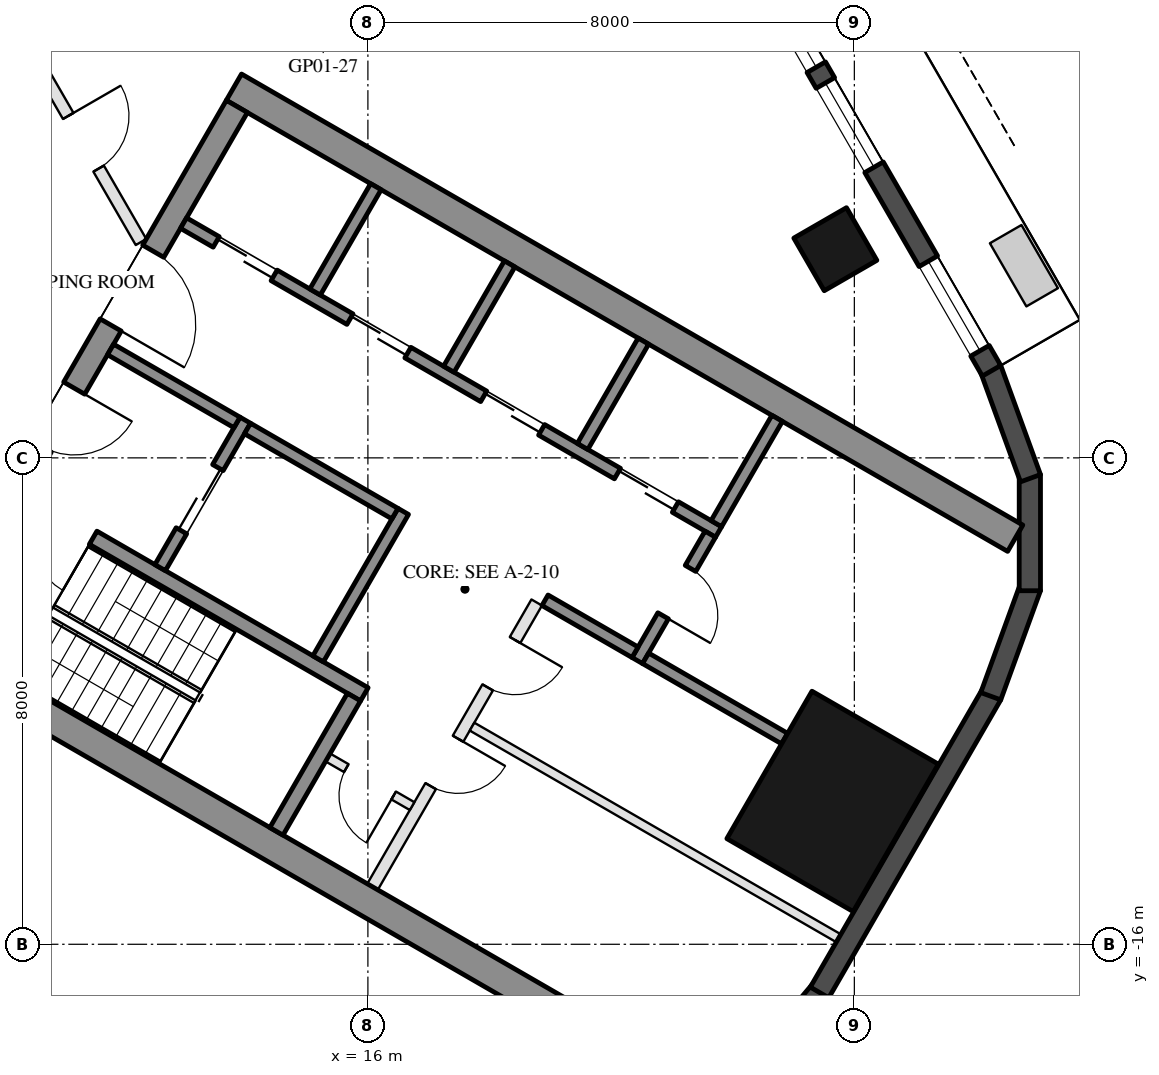
"""IFC4 building model, lengths in metres.
Left out: names, types, materials, properties, quantities, classifications, styles, units other than length and angle.
Written with IfcOpenShell. Run it as: python <this file> out.ifc"""

import sys

from ifc_helpers import new_model, si_unit, direction, frame, frame_2d, origin, origin_2d, place, context, subcontext, project, spatial, rectangle, hollow_rectangle, extrude, element, fill, save


model = new_model("IFC4")
c1 = context("Model", 3, precision=1e-05, world=origin(), true_north=direction((0.0, 1.0)))
c2 = subcontext(c1, "Body", "Model", "MODEL_VIEW")
j1 = project(units=[si_unit("LENGTHUNIT", "METRE"), si_unit("PLANEANGLEUNIT", "RADIAN")], contexts=[c1])
p1 = place(None, origin())
s1 = spatial("IfcSite", under=j1, at=p1, CompositionType="ELEMENT")
p2 = place(p1, origin())
s2 = spatial("IfcBuilding", under=s1, at=p2, CompositionType="ELEMENT")
p3 = place(p2, frame((0.0, 0.0, 50.2)))
s3 = spatial("IfcBuildingStorey", under=s2, at=p3, CompositionType="ELEMENT", Elevation=50.2)
p4 = place(p3, frame((23.688, -4.568, 0.0), z_axis=(0.0, 0.0, 1.0), x_axis=(-0.5, 0.866025403784, 0.0)))
e1 = element("IfcColumn", 1, at=p4, inside=s3, PredefinedType="COLUMN", context=c2, shape_type="SweptSolid", body=[
    extrude(hollow_rectangle(XDim=1.0, YDim=1.0, WallThickness=0.045, at=origin_2d()), origin(), (0.0, 0.0, 1.0), 3.7),
])
p5 = place(p3, frame((23.643, -13.65, 0.0), z_axis=(0.0, 0.0, 1.0), x_axis=(0.5, 0.866025403784, 0.0)))
e2 = element("IfcColumn", 2, at=p5, inside=s3, PredefinedType="COLUMN", context=c2, shape_type="SweptSolid", body=[
    extrude(hollow_rectangle(XDim=2.8, YDim=2.4, WallThickness=0.07, at=origin_2d()), origin(), (0.0, 0.0, 1.0), 3.7),
])
p6 = place(p3, frame((22.217, -18.231, 0.0), z_axis=(0.0, 0.0, 1.0), x_axis=(0.642733291068, 0.76609001857, 0.0)))
e3 = element("IfcWall", 3, at=p6, inside=s3, PredefinedType="SOLIDWALL", context=c2, shape_type="SweptSolid", body=[
    extrude(rectangle(XDim=1.91, YDim=0.35, at=frame_2d((0.955, 0.0))), origin(), (0.0, 0.0, 1.0), 3.55),
])
p7 = place(p3, frame((23.427, -16.792, 0.0), z_axis=(0.0, 0.0, 1.0), x_axis=(0.500018773155, 0.866014564827, 0.0)))
e4 = element("IfcWall", 4, at=p7, inside=s3, PredefinedType="SOLIDWALL", context=c2, shape_type="SweptSolid", body=[
    extrude(rectangle(XDim=5.658, YDim=0.35, at=frame_2d((2.829, 0.0))), origin(), (0.0, 0.0, 1.0), 3.55),
])
for number, where, z_axis, x_axis in (
    (5, (26.244, -11.92, 0.0), (0.0, 0.0, 1.0), (0.342, 0.94, 0.0)),
    (6, (26.886, -10.185, 0.0), (0.0, 0.0, 1.0), (0.0, 1.0, 0.0)),
    (7, (26.897, -8.335, 0.0), (0.0, 0.0, 1.0), (-0.342, 0.94, 0.0)),
):
    element("IfcWall", number, at=place(p3, frame(where, z_axis=z_axis, x_axis=x_axis)), inside=s3, PredefinedType="SOLIDWALL", context=c2, shape_type="SweptSolid", body=[
        extrude(rectangle(XDim=1.91, YDim=0.35, at=frame_2d((0.955, 0.0))), origin(), (0.0, 0.0, 1.0), 3.55),
    ])
p8 = place(p3, frame((26.257, -6.567, 0.0), z_axis=(0.0, 0.0, 1.0), x_axis=(-0.500023526245, 0.866011820475, 0.0)))
e8 = element("IfcWall", 8, at=p8, inside=s3, PredefinedType="SOLIDWALL", context=c2, shape_type="SweptSolid", body=[
    extrude(rectangle(XDim=11.816, YDim=0.35, at=frame_2d((5.908, 0.0))), origin(), (0.0, 0.0, 1.0), 3.55),
])
p9 = place(p8, frame((0.38, 0.0, 0.3)))
e9 = element("IfcOpeningElement", 9, at=p9, cuts=e8, PredefinedType="OPENING", context=c2, shape_type="SweptSolid", body=[
    extrude(rectangle(XDim=1.7, YDim=2.65, at=frame_2d((0.85, 1.325))), frame((0.0, 0.185, 0.0), z_axis=(0.0, -1.0, 0.0), x_axis=(1.0, 0.0, 0.0)), (0.0, 0.0, 1.0), 0.37),
])
p10 = place(p8, frame((7.666, 0.0, 0.0)))
e10 = element("IfcOpeningElement", 10, at=p10, cuts=e8, PredefinedType="OPENING", context=c2, shape_type="SweptSolid", body=[
    extrude(rectangle(XDim=2.4, YDim=2.4, at=frame_2d((1.2, 1.2))), frame((0.0, 0.185, 0.0), z_axis=(0.0, -1.0, 0.0), x_axis=(1.0, 0.0, 0.0)), (0.0, 0.0, 1.0), 0.37),
])
p11 = place(p8, frame((3.865, 0.0, 0.3)))
e11 = element("IfcOpeningElement", 11, at=p11, cuts=e8, PredefinedType="OPENING", context=c2, shape_type="SweptSolid", body=[
    extrude(rectangle(XDim=1.6, YDim=2.65, at=frame_2d((0.8, 1.325))), frame((0.0, 0.185, 0.0), z_axis=(0.0, -1.0, 0.0), x_axis=(1.0, 0.0, 0.0)), (0.0, 0.0, 1.0), 0.37),
])
p12 = place(p8, frame((5.765, 0.0, 0.3)))
e12 = element("IfcOpeningElement", 12, at=p12, cuts=e8, PredefinedType="OPENING", context=c2, shape_type="SweptSolid", body=[
    extrude(rectangle(XDim=1.6, YDim=2.65, at=frame_2d((0.8, 1.325))), frame((0.0, 0.185, 0.0), z_axis=(0.0, -1.0, 0.0), x_axis=(1.0, 0.0, 0.0)), (0.0, 0.0, 1.0), 0.37),
])
for number, where, z_axis, x_axis in (
    (13, (8.547, -10.997, 0.0), (0.0, 0.0, 1.0), (0.866, -0.5, 0.0)),
    (14, (13.797, -1.903, 0.0), (0.0, 0.0, 1.0), (0.866, -0.5, 0.0)),
):
    element("IfcWall", number, at=place(p3, frame(where, z_axis=z_axis, x_axis=x_axis)), inside=s3, PredefinedType="SHEAR", context=c2, shape_type="SweptSolid", body=[
        extrude(rectangle(XDim=14.837, YDim=0.5, at=frame_2d((7.418, 0.0))), origin(), (0.0, 0.0, 1.0), 3.5),
    ])
p13 = place(p3, frame((8.845, -10.88, 0.0), z_axis=(0.0, 0.0, 1.0), x_axis=(0.500004234368, 0.866022959057, 0.0)))
e15 = element("IfcWall", 15, at=p13, inside=s3, PredefinedType="SHEAR", context=c2, shape_type="SweptSolid", body=[
    extrude(rectangle(XDim=10.0, YDim=0.4, at=frame_2d((5.0, 0.0))), origin(), (0.0, 0.0, 1.0), 3.5),
])
p14 = place(p13, frame((3.55, 0.0, 0.0)))
e16 = element("IfcOpeningElement", 16, at=p14, cuts=e15, PredefinedType="OPENING", context=c2, shape_type="SweptSolid", body=[
    extrude(rectangle(XDim=1.1, YDim=2.1, at=frame_2d((0.55, 1.05))), frame((0.0, 0.21, 0.0), z_axis=(0.0, -1.0, 0.0), x_axis=(1.0, 0.0, 0.0)), (0.0, 0.0, 1.0), 0.42),
])
p15 = place(p13, frame((5.85, 0.0, 0.0)))
e17 = element("IfcOpeningElement", 17, at=p15, cuts=e15, PredefinedType="OPENING", context=c2, shape_type="SweptSolid", body=[
    extrude(rectangle(XDim=1.4, YDim=2.1, at=frame_2d((0.7, 1.05))), frame((0.0, 0.21, 0.0), z_axis=(0.0, -1.0, 0.0), x_axis=(1.0, 0.0, 0.0)), (0.0, 0.0, 1.0), 0.42),
])
p16 = place(p3, frame((10.356, -8.664, 0.0), z_axis=(0.0, 0.0, 1.0), x_axis=(0.866028629588, -0.499994412703, 0.0)))
e18 = element("IfcWall", 18, at=p16, inside=s3, PredefinedType="SHEAR", context=c2, shape_type="SweptSolid", body=[
    extrude(rectangle(XDim=6.45, YDim=0.25, at=frame_2d((3.225, 0.0))), origin(), (0.0, 0.0, 1.0), 3.5),
])
p17 = place(p16, frame((0.3, 0.0, 0.0)))
e19 = element("IfcOpeningElement", 19, at=p17, cuts=e18, PredefinedType="OPENING", context=c2, shape_type="SweptSolid", body=[
    extrude(rectangle(XDim=1.0, YDim=2.1, at=frame_2d((0.5, 1.05))), frame((0.0, 0.135, 0.0), z_axis=(0.0, -1.0, 0.0), x_axis=(1.0, 0.0, 0.0)), (0.0, 0.0, 1.0), 0.27),
])
p18 = place(p3, frame((14.496, -14.143, 0.0), z_axis=(0.0, 0.0, 1.0), x_axis=(0.500062241894, 0.865989465428, 0.0)))
e20 = element("IfcWall", 20, at=p18, inside=s3, PredefinedType="SHEAR", context=c2, shape_type="SweptSolid", body=[
    extrude(rectangle(XDim=2.55, YDim=0.25, at=frame_2d((1.275, 0.0))), origin(), (0.0, 0.0, 1.0), 3.5),
])
p19 = place(p3, frame((15.181, -11.305, 0.0), z_axis=(0.0, 0.0, 1.0), x_axis=(0.49994636267, 0.866056369097, 0.0)))
e21 = element("IfcWall", 21, at=p19, inside=s3, PredefinedType="SHEAR", context=c2, shape_type="SweptSolid", body=[
    extrude(rectangle(XDim=2.8, YDim=0.2, at=frame_2d((1.4, 0.0))), origin(), (0.0, 0.0, 1.0), 3.5),
])
p20 = place(p3, frame((12.583, -9.805, 0.0), z_axis=(0.0, 0.0, 1.0), x_axis=(0.49994636267, 0.866056369097, 0.0)))
e22 = element("IfcWall", 22, at=p20, inside=s3, PredefinedType="SHEAR", context=c2, shape_type="SweptSolid", body=[
    extrude(rectangle(XDim=2.8, YDim=0.2, at=frame_2d((1.4, 0.0))), origin(), (0.0, 0.0, 1.0), 3.5),
])
p21 = place(p20, frame((0.7, 0.0, 0.0)))
e23 = element("IfcOpeningElement", 23, at=p21, cuts=e22, PredefinedType="OPENING", context=c2, shape_type="SweptSolid", body=[
    extrude(rectangle(XDim=1.2, YDim=2.1, at=frame_2d((0.6, 1.05))), frame((0.0, 0.11, 0.0), z_axis=(0.0, -1.0, 0.0), x_axis=(1.0, 0.0, 0.0)), (0.0, 0.0, 1.0), 0.22),
])
p22 = place(p3, frame((11.768, -6.217, 0.0), z_axis=(0.0, 0.0, 1.0), x_axis=(0.866050077142, -0.499957262057, 0.0)))
e24 = element("IfcWall", 24, at=p22, inside=s3, PredefinedType="SHEAR", context=c2, shape_type="SweptSolid", body=[
    extrude(rectangle(XDim=2.4, YDim=0.2, at=frame_2d((1.2, 0.0))), origin(), (0.0, 0.0, 1.0), 3.5),
])
p23 = place(p3, frame((14.02, -7.517, 0.0), z_axis=(0.0, 0.0, 1.0), x_axis=(0.866034573852, -0.49998411664, 0.0)))
e25 = element("IfcWall", 25, at=p23, inside=s3, PredefinedType="SHEAR", context=c2, shape_type="SweptSolid", body=[
    extrude(rectangle(XDim=2.8, YDim=0.2, at=frame_2d((1.4, 0.0))), origin(), (0.0, 0.0, 1.0), 3.5),
])
p24 = place(p3, frame((12.968, -4.138, 0.0), z_axis=(0.0, 0.0, 1.0), x_axis=(0.866028328073, -0.49999493495, 0.0)))
e26 = element("IfcWall", 26, at=p24, inside=s3, PredefinedType="SHEAR", context=c2, shape_type="SweptSolid", body=[
    extrude(rectangle(XDim=10.16, YDim=0.2, at=frame_2d((5.08, 0.0))), origin(), (0.0, 0.0, 1.0), 3.5),
])
p25 = place(p24, frame((0.62, 0.0, 0.0)))
e27 = element("IfcOpeningElement", 27, at=p25, cuts=e26, PredefinedType="OPENING", context=c2, shape_type="SweptSolid", body=[
    extrude(rectangle(XDim=1.1, YDim=2.1, at=frame_2d((0.55, 1.05))), frame((0.0, 0.11, 0.0), z_axis=(0.0, -1.0, 0.0), x_axis=(1.0, 0.0, 0.0)), (0.0, 0.0, 1.0), 0.22),
])
p26 = place(p24, frame((3.16, 0.0, 0.0)))
e28 = element("IfcOpeningElement", 28, at=p26, cuts=e26, PredefinedType="OPENING", context=c2, shape_type="SweptSolid", body=[
    extrude(rectangle(XDim=1.1, YDim=2.1, at=frame_2d((0.55, 1.05))), frame((0.0, 0.11, 0.0), z_axis=(0.0, -1.0, 0.0), x_axis=(1.0, 0.0, 0.0)), (0.0, 0.0, 1.0), 0.22),
])
p27 = place(p24, frame((5.7, 0.0, 0.0)))
e29 = element("IfcOpeningElement", 29, at=p27, cuts=e26, PredefinedType="OPENING", context=c2, shape_type="SweptSolid", body=[
    extrude(rectangle(XDim=1.1, YDim=2.1, at=frame_2d((0.55, 1.05))), frame((0.0, 0.11, 0.0), z_axis=(0.0, -1.0, 0.0), x_axis=(1.0, 0.0, 0.0)), (0.0, 0.0, 1.0), 0.22),
])
p28 = place(p24, frame((8.24, 0.0, 0.0)))
e30 = element("IfcOpeningElement", 30, at=p28, cuts=e26, PredefinedType="OPENING", context=c2, shape_type="SweptSolid", body=[
    extrude(rectangle(XDim=1.1, YDim=2.1, at=frame_2d((0.55, 1.05))), frame((0.0, 0.11, 0.0), z_axis=(0.0, -1.0, 0.0), x_axis=(1.0, 0.0, 0.0)), (0.0, 0.0, 1.0), 0.22),
])
p29 = place(p3, frame((20.43, -11.333, 0.0), z_axis=(0.0, 0.0, 1.0), x_axis=(0.500001309137, 0.866024647952, 0.0)))
e31 = element("IfcWall", 31, at=p29, inside=s3, PredefinedType="SHEAR", context=c2, shape_type="SweptSolid", body=[
    extrude(rectangle(XDim=2.4, YDim=0.2, at=frame_2d((1.2, 0.0))), origin(), (0.0, 0.0, 1.0), 3.5),
])
p30 = place(p29, frame((0.85, 0.0, 0.0)))
e32 = element("IfcOpeningElement", 32, at=p30, cuts=e31, PredefinedType="OPENING", context=c2, shape_type="SweptSolid", body=[
    extrude(rectangle(XDim=0.9, YDim=2.1, at=frame_2d((0.45, 1.05))), frame((0.0, 0.11, 0.0), z_axis=(0.0, -1.0, 0.0), x_axis=(1.0, 0.0, 0.0)), (0.0, 0.0, 1.0), 0.22),
])
p31 = place(p3, frame((18.913, -10.342, 0.0), z_axis=(0.0, 0.0, 1.0), x_axis=(0.866038183914, -0.499977863513, 0.0)))
e33 = element("IfcWall", 33, at=p31, inside=s3, PredefinedType="SHEAR", context=c2, shape_type="SweptSolid", body=[
    extrude(rectangle(XDim=1.71, YDim=0.2, at=frame_2d((0.855, 0.0))), origin(), (0.0, 0.0, 1.0), 3.5),
])
for number, where, z_axis, x_axis in (
    (34, (15.131, -5.272, 0.0), (0.0, 0.0, 1.0), (0.5, 0.866, 0.0)),
    (35, (17.331, -6.542, 0.0), (0.0, 0.0, 1.0), (0.5, 0.866, 0.0)),
    (36, (19.531, -7.812, 0.0), (0.0, 0.0, 1.0), (0.5, 0.866, 0.0)),
    (37, (21.73, -9.082, 0.0), (0.0, 0.0, 1.0), (0.5, 0.866, 0.0)),
):
    element("IfcWall", number, at=place(p3, frame(where, z_axis=z_axis, x_axis=x_axis)), inside=s3, PredefinedType="SHEAR", context=c2, shape_type="SweptSolid", body=[
        extrude(rectangle(XDim=2.0, YDim=0.2, at=frame_2d((1.0, 0.0))), origin(), (0.0, 0.0, 1.0), 3.5),
    ])
p32 = place(p3, frame((20.567, -11.297, 0.0), z_axis=(0.0, 0.0, 1.0), x_axis=(0.866060851709, -0.499938597367, 0.0)))
e38 = element("IfcWall", 38, at=p32, inside=s3, PredefinedType="SHEAR", context=c2, shape_type="SweptSolid", body=[
    extrude(rectangle(XDim=2.64, YDim=0.2, at=frame_2d((1.32, 0.0))), origin(), (0.0, 0.0, 1.0), 3.5),
])
p33 = place(p3, frame((16.076, -15.055, 0.0), z_axis=(0.0, 0.0, 1.0), x_axis=(0.499995103361, 0.866028230842, 0.0)))
e39 = element("IfcWall", 39, at=p33, inside=s3, PredefinedType="PARTITIONING", context=c2, shape_type="SweptSolid", body=[
    extrude(rectangle(XDim=5.4, YDim=0.2, at=frame_2d((2.7, 0.0))), origin(), (0.0, 0.0, 1.0), 3.5),
])
p34 = place(p33, frame((1.913, 0.0, 0.0)))
e40 = element("IfcOpeningElement", 40, at=p34, cuts=e39, PredefinedType="OPENING", context=c2, shape_type="SweptSolid", body=[
    extrude(rectangle(XDim=0.9, YDim=2.1, at=frame_2d((0.45, 1.05))), frame((0.0, 0.11, 0.0), z_axis=(0.0, -1.0, 0.0), x_axis=(1.0, 0.0, 0.0)), (0.0, 0.0, 1.0), 0.22),
])
p35 = place(p33, frame((3.788, 0.0, 0.0)))
e41 = element("IfcOpeningElement", 41, at=p35, cuts=e39, PredefinedType="OPENING", context=c2, shape_type="SweptSolid", body=[
    extrude(rectangle(XDim=0.9, YDim=2.1, at=frame_2d((0.45, 1.05))), frame((0.0, 0.11, 0.0), z_axis=(0.0, -1.0, 0.0), x_axis=(1.0, 0.0, 0.0)), (0.0, 0.0, 1.0), 0.22),
])
p36 = place(p3, frame((15.342, -12.928, 0.0), z_axis=(0.0, 0.0, 1.0), x_axis=(0.865989903783, -0.500061482766, 0.0)))
e42 = element("IfcWall", 42, at=p36, inside=s3, PredefinedType="PARTITIONING", context=c2, shape_type="SweptSolid", body=[
    extrude(rectangle(XDim=1.6, YDim=0.15, at=frame_2d((0.8, 0.0))), origin(), (0.0, 0.0, 1.0), 3.5),
])
p37 = place(p36, frame((0.35, 0.0, 0.0)))
e43 = element("IfcOpeningElement", 43, at=p37, cuts=e42, PredefinedType="OPENING", context=c2, shape_type="SweptSolid", body=[
    extrude(rectangle(XDim=0.9, YDim=2.1, at=frame_2d((0.45, 1.05))), frame((0.0, 0.085, 0.0), z_axis=(0.0, -1.0, 0.0), x_axis=(1.0, 0.0, 0.0)), (0.0, 0.0, 1.0), 0.17),
])
p38 = place(p3, frame((17.713, -12.42, 0.0), z_axis=(0.0, 0.0, 1.0), x_axis=(0.866016523273, -0.500015381182, 0.0)))
e44 = element("IfcWall", 44, at=p38, inside=s3, PredefinedType="PARTITIONING", context=c2, shape_type="SweptSolid", body=[
    extrude(rectangle(XDim=6.95, YDim=0.15, at=frame_2d((3.475, 0.0))), origin(), (0.0, 0.0, 1.0), 3.5),
])
p39 = place(p3, frame((10.375, -1.169, 0.0), z_axis=(0.0, 0.0, 1.0), x_axis=(0.500055316652, -0.865993464345, 0.0)))
e45 = element("IfcWall", 45, at=p39, inside=s3, PredefinedType="PARTITIONING", context=c2, shape_type="SweptSolid", body=[
    extrude(rectangle(XDim=3.788, YDim=0.2, at=frame_2d((1.894, 0.0))), origin(), (0.0, 0.0, 1.0), 2.95),
])
p40 = place(p39, frame((1.394, 0.0, 0.0)))
e46 = element("IfcOpeningElement", 46, at=p40, cuts=e45, PredefinedType="OPENING", context=c2, shape_type="SweptSolid", body=[
    extrude(rectangle(XDim=1.0, YDim=2.1, at=frame_2d((0.5, 1.05))), frame((0.0, 0.11, 0.0), z_axis=(0.0, -1.0, 0.0), x_axis=(1.0, 0.0, 0.0)), (0.0, 0.0, 1.0), 0.22),
])
p41 = place(p9, origin())
e47 = element("IfcWindow", 47, at=p41, inside=s3, PartitioningType="SINGLE_PANEL", PredefinedType="WINDOW", context=c2, shape_type="SweptSolid", body=[
    extrude(rectangle(XDim=1.7, YDim=2.65, at=frame_2d((0.85, 1.325))), frame((0.0, 0.03, 0.0), z_axis=(0.0, -1.0, 0.0), x_axis=(1.0, 0.0, 0.0)), (0.0, 0.0, 1.0), 0.06),
])
fill(e9, e47)
p42 = place(p11, origin())
e48 = element("IfcWindow", 48, at=p42, inside=s3, PartitioningType="SINGLE_PANEL", PredefinedType="WINDOW", context=c2, shape_type="SweptSolid", body=[
    extrude(rectangle(XDim=1.6, YDim=2.65, at=frame_2d((0.8, 1.325))), frame((0.0, 0.03, 0.0), z_axis=(0.0, -1.0, 0.0), x_axis=(1.0, 0.0, 0.0)), (0.0, 0.0, 1.0), 0.06),
])
fill(e11, e48)
p43 = place(p12, origin())
e49 = element("IfcWindow", 49, at=p43, inside=s3, PartitioningType="SINGLE_PANEL", PredefinedType="WINDOW", context=c2, shape_type="SweptSolid", body=[
    extrude(rectangle(XDim=1.6, YDim=2.65, at=frame_2d((0.8, 1.325))), frame((0.0, 0.03, 0.0), z_axis=(0.0, -1.0, 0.0), x_axis=(1.0, 0.0, 0.0)), (0.0, 0.0, 1.0), 0.06),
])
fill(e12, e49)
p44 = place(p21, origin())
e50 = element("IfcDoor", 50, at=p44, inside=s3, OperationType="DOUBLE_DOOR_SLIDING", PredefinedType="DOOR", context=c2, shape_type="SweptSolid", body=[
    extrude(rectangle(XDim=1.2, YDim=2.1, at=frame_2d((0.6, 1.05))), frame((0.0, 0.025, 0.0), z_axis=(0.0, -1.0, 0.0), x_axis=(1.0, 0.0, 0.0)), (0.0, 0.0, 1.0), 0.05),
])
fill(e23, e50)
p45 = place(p37, frame((0.9, 0.0, 0.0), z_axis=(0.0, 0.0, 1.0), x_axis=(-1.0, 0.0, 0.0)))
e51 = element("IfcDoor", 51, at=p45, inside=s3, OperationType="SINGLE_SWING_LEFT", PredefinedType="DOOR", context=c2, shape_type="SweptSolid", body=[
    extrude(rectangle(XDim=0.9, YDim=2.1, at=frame_2d((0.45, 1.05))), frame((0.0, 0.025, 0.0), z_axis=(0.0, -1.0, 0.0), x_axis=(1.0, 0.0, 0.0)), (0.0, 0.0, 1.0), 0.05),
])
fill(e43, e51)
p46 = place(p25, origin())
e52 = element("IfcDoor", 52, at=p46, inside=s3, OperationType="DOUBLE_DOOR_SLIDING", PredefinedType="DOOR", context=c2, shape_type="SweptSolid", body=[
    extrude(rectangle(XDim=1.1, YDim=2.1, at=frame_2d((0.55, 1.05))), frame((0.0, 0.025, 0.0), z_axis=(0.0, -1.0, 0.0), x_axis=(1.0, 0.0, 0.0)), (0.0, 0.0, 1.0), 0.05),
])
fill(e27, e52)
p47 = place(p26, origin())
e53 = element("IfcDoor", 53, at=p47, inside=s3, OperationType="DOUBLE_DOOR_SLIDING", PredefinedType="DOOR", context=c2, shape_type="SweptSolid", body=[
    extrude(rectangle(XDim=1.1, YDim=2.1, at=frame_2d((0.55, 1.05))), frame((0.0, 0.025, 0.0), z_axis=(0.0, -1.0, 0.0), x_axis=(1.0, 0.0, 0.0)), (0.0, 0.0, 1.0), 0.05),
])
fill(e28, e53)
p48 = place(p27, origin())
e54 = element("IfcDoor", 54, at=p48, inside=s3, OperationType="DOUBLE_DOOR_SLIDING", PredefinedType="DOOR", context=c2, shape_type="SweptSolid", body=[
    extrude(rectangle(XDim=1.1, YDim=2.1, at=frame_2d((0.55, 1.05))), frame((0.0, 0.025, 0.0), z_axis=(0.0, -1.0, 0.0), x_axis=(1.0, 0.0, 0.0)), (0.0, 0.0, 1.0), 0.05),
])
fill(e29, e54)
p49 = place(p28, origin())
e55 = element("IfcDoor", 55, at=p49, inside=s3, OperationType="DOUBLE_DOOR_SLIDING", PredefinedType="DOOR", context=c2, shape_type="SweptSolid", body=[
    extrude(rectangle(XDim=1.1, YDim=2.1, at=frame_2d((0.55, 1.05))), frame((0.0, 0.025, 0.0), z_axis=(0.0, -1.0, 0.0), x_axis=(1.0, 0.0, 0.0)), (0.0, 0.0, 1.0), 0.05),
])
fill(e30, e55)
p50 = place(p30, frame((0.9, 0.0, 0.0), z_axis=(0.0, 0.0, 1.0), x_axis=(-1.0, 0.0, 0.0)))
e56 = element("IfcDoor", 56, at=p50, inside=s3, OperationType="SINGLE_SWING_RIGHT", PredefinedType="DOOR", context=c2, shape_type="SweptSolid", body=[
    extrude(rectangle(XDim=0.9, YDim=2.1, at=frame_2d((0.45, 1.05))), frame((0.0, 0.025, 0.0), z_axis=(0.0, -1.0, 0.0), x_axis=(1.0, 0.0, 0.0)), (0.0, 0.0, 1.0), 0.05),
])
fill(e32, e56)
p51 = place(p34, frame((0.9, 0.0, 0.0), z_axis=(0.0, 0.0, 1.0), x_axis=(-1.0, 0.0, 0.0)))
e57 = element("IfcDoor", 57, at=p51, inside=s3, OperationType="SINGLE_SWING_LEFT", PredefinedType="DOOR", context=c2, shape_type="SweptSolid", body=[
    extrude(rectangle(XDim=0.9, YDim=2.1, at=frame_2d((0.45, 1.05))), frame((0.0, 0.025, 0.0), z_axis=(0.0, -1.0, 0.0), x_axis=(1.0, 0.0, 0.0)), (0.0, 0.0, 1.0), 0.05),
])
fill(e40, e57)
p52 = place(p35, frame((0.9, 0.0, 0.0), z_axis=(0.0, 0.0, 1.0), x_axis=(-1.0, 0.0, 0.0)))
e58 = element("IfcDoor", 58, at=p52, inside=s3, OperationType="SINGLE_SWING_LEFT", PredefinedType="DOOR", context=c2, shape_type="SweptSolid", body=[
    extrude(rectangle(XDim=0.9, YDim=2.1, at=frame_2d((0.45, 1.05))), frame((0.0, 0.025, 0.0), z_axis=(0.0, -1.0, 0.0), x_axis=(1.0, 0.0, 0.0)), (0.0, 0.0, 1.0), 0.05),
])
fill(e41, e58)
p53 = place(p14, frame((1.1, 0.0, 0.0), z_axis=(0.0, 0.0, 1.0), x_axis=(-1.0, 0.0, 0.0)))
e59 = element("IfcDoor", 59, at=p53, inside=s3, OperationType="SINGLE_SWING_LEFT", PredefinedType="DOOR", context=c2, shape_type="SweptSolid", body=[
    extrude(rectangle(XDim=1.1, YDim=2.1, at=frame_2d((0.55, 1.05))), frame((0.0, 0.025, 0.0), z_axis=(0.0, -1.0, 0.0), x_axis=(1.0, 0.0, 0.0)), (0.0, 0.0, 1.0), 0.05),
])
fill(e16, e59)
p54 = place(p15, frame((1.4, 0.0, 0.0), z_axis=(0.0, 0.0, 1.0), x_axis=(-1.0, 0.0, 0.0)))
e60 = element("IfcDoor", 60, at=p54, inside=s3, OperationType="DOUBLE_DOOR_SINGLE_SWING", PredefinedType="DOOR", context=c2, shape_type="SweptSolid", body=[
    extrude(rectangle(XDim=1.4, YDim=2.1, at=frame_2d((0.7, 1.05))), frame((0.0, 0.025, 0.0), z_axis=(0.0, -1.0, 0.0), x_axis=(1.0, 0.0, 0.0)), (0.0, 0.0, 1.0), 0.05),
])
fill(e17, e60)
p55 = place(p17, frame((1.0, 0.0, 0.0), z_axis=(0.0, 0.0, 1.0), x_axis=(-1.0, 0.0, 0.0)))
e61 = element("IfcDoor", 61, at=p55, inside=s3, OperationType="SINGLE_SWING_LEFT", PredefinedType="DOOR", context=c2, shape_type="SweptSolid", body=[
    extrude(rectangle(XDim=1.0, YDim=2.1, at=frame_2d((0.5, 1.05))), frame((0.0, 0.025, 0.0), z_axis=(0.0, -1.0, 0.0), x_axis=(1.0, 0.0, 0.0)), (0.0, 0.0, 1.0), 0.05),
])
fill(e19, e61)
p56 = place(p40, origin())
e62 = element("IfcDoor", 62, at=p56, inside=s3, OperationType="SINGLE_SWING_LEFT", PredefinedType="DOOR", context=c2, shape_type="SweptSolid", body=[
    extrude(rectangle(XDim=1.0, YDim=2.1, at=frame_2d((0.5, 1.05))), frame((0.0, 0.025, 0.0), z_axis=(0.0, -1.0, 0.0), x_axis=(1.0, 0.0, 0.0)), (0.0, 0.0, 1.0), 0.05),
])
fill(e46, e62)
save(model, sys.argv[1])
